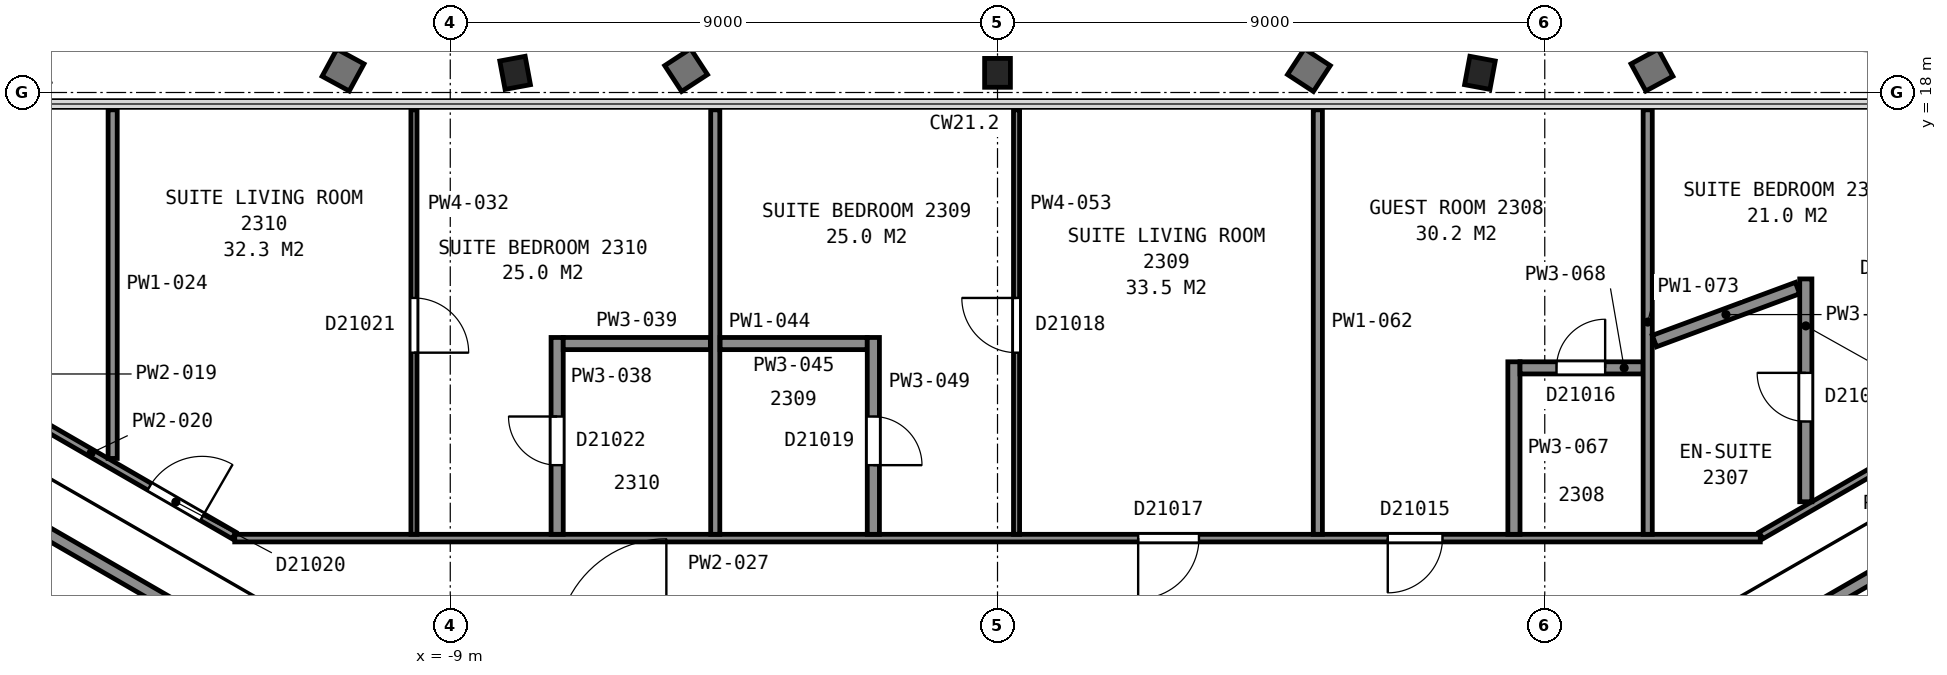
"""IFC4 building model, lengths in metres.
Left out: names, types, materials, properties, quantities, classifications, styles, units other than length and angle.
Written with IfcOpenShell. Run it as: python <this file> out.ifc"""

import sys

from ifc_helpers import new_model, si_unit, direction, frame, frame_2d, origin, origin_2d, place, context, subcontext, project, spatial, rectangle, i_section, extrude, element, fill, save


model = new_model("IFC4")
c1 = context("Model", 3, precision=1e-05, world=origin(), true_north=direction((0.0, 1.0)))
c2 = subcontext(c1, "Body", "Model", "MODEL_VIEW")
j1 = project(units=[si_unit("LENGTHUNIT", "METRE"), si_unit("PLANEANGLEUNIT", "RADIAN")], contexts=[c1])
p1 = place(None, origin())
s1 = spatial("IfcSite", under=j1, at=p1, CompositionType="ELEMENT")
p2 = place(p1, origin())
s2 = spatial("IfcBuilding", under=s1, at=p2, CompositionType="ELEMENT")
p3 = place(p2, frame((0.0, 0.0, 100.0)))
s3 = spatial("IfcBuildingStorey", under=s2, at=p3, CompositionType="ELEMENT", Elevation=100.0)
p4 = place(p3, frame((7.891, 18.098, 0.04), z_axis=(0.035448987622, 0.190716914211, 0.981004805243), x_axis=(0.999348805, -0.000151262894, -0.036082448156)))
e1 = element("IfcColumn", 1, at=p4, inside=s3, PredefinedType="COLUMN", context=c2, shape_type="SweptSolid", body=[
    extrude(i_section(OverallWidth=0.424, OverallDepth=0.475, WebThickness=0.048, FlangeThickness=0.077, FilletRadius=0.015, at=origin_2d()), origin(), (0.0, 0.0, 1.0), 3.588),
])
p5 = place(p3, frame((0.0, 18.097, 0.035), z_axis=(0.0, 0.190904184005, 0.981608675863), x_axis=(1.0, 0.0, 0.0)))
e2 = element("IfcColumn", 2, at=p5, inside=s3, PredefinedType="COLUMN", context=c2, shape_type="SweptSolid", body=[
    extrude(i_section(OverallWidth=0.424, OverallDepth=0.475, WebThickness=0.048, FlangeThickness=0.077, FilletRadius=0.015, at=origin_2d()), origin(), (0.0, 0.0, 1.0), 3.596),
])
p6 = place(p3, frame((-7.891, 18.098, 0.04), z_axis=(-0.035448987622, 0.190716914211, 0.981004805243), x_axis=(0.999348805, 0.000151262894, 0.036082448156)))
e3 = element("IfcColumn", 3, at=p6, inside=s3, PredefinedType="COLUMN", context=c2, shape_type="SweptSolid", body=[
    extrude(i_section(OverallWidth=0.424, OverallDepth=0.475, WebThickness=0.048, FlangeThickness=0.077, FilletRadius=0.015, at=origin_2d()), origin(), (0.0, 0.0, 1.0), 3.588),
])
for number, where, z_axis, x_axis in (
    (4, (6.178, 5.299, 0.0), (0.0, 0.0, 1.0), (0.866, 0.5, 0.0)),
    (5, (-6.178, 5.299, 0.0), (0.0, 0.0, 1.0), (-0.866, 0.5, 0.0)),
):
    element("IfcWall", number, at=place(p3, frame(where, z_axis=z_axis, x_axis=x_axis)), inside=s3, PredefinedType="PARTITIONING", context=c2, shape_type="SweptSolid", body=[
        extrude(rectangle(XDim=12.0, YDim=0.2, at=frame_2d((6.0, 0.0))), origin(), (0.0, 0.0, 1.0), 3.35),
    ])
p7 = place(p3, frame((-15.867, 12.625, 0.0), z_axis=(0.0, 0.0, 1.0), x_axis=(0.86603035395, -0.499991425964, 0.0)))
e6 = element("IfcWall", 6, at=p7, inside=s3, PredefinedType="PARTITIONING", context=c2, shape_type="SweptSolid", body=[
    extrude(rectangle(XDim=3.824, YDim=0.125, at=frame_2d((1.912, 0.0))), origin(), (0.0, 0.0, 1.0), 2.613),
])
p8 = place(p7, frame((2.219, 0.0, 0.0)))
e7 = element("IfcOpeningElement", 7, at=p8, cuts=e6, PredefinedType="OPENING", context=c2, shape_type="SweptSolid", body=[
    extrude(rectangle(XDim=1.0, YDim=2.1, at=frame_2d((0.5, 1.05))), frame((0.0, 0.073, 0.0), z_axis=(0.0, -1.0, 0.0), x_axis=(1.0, 0.0, 0.0)), (0.0, 0.0, 1.0), 0.145),
])
p9 = place(p3, frame((-14.552, 11.981, 0.0), z_axis=(0.0, 0.0, 1.0), x_axis=(0.0, 1.0, 0.0)))
e8 = element("IfcWall", 8, at=p9, inside=s3, PredefinedType="PARTITIONING", context=c2, shape_type="SweptSolid", body=[
    extrude(rectangle(XDim=5.734, YDim=0.15, at=frame_2d((2.867, 0.0))), origin(), (0.0, 0.0, 1.0), 2.613),
])
p10 = place(p3, frame((-12.544, 10.671, 0.0), z_axis=(0.0, 0.0, 1.0), x_axis=(1.0, 0.0, 0.0)))
e9 = element("IfcWall", 9, at=p10, inside=s3, PredefinedType="PARTITIONING", context=c2, shape_type="SweptSolid", body=[
    extrude(rectangle(XDim=25.089, YDim=0.125, at=frame_2d((12.544, 0.0))), origin(), (0.0, 0.0, 1.0), 2.613),
])
p11 = place(p10, frame((18.962, 0.0, 0.0)))
e10 = element("IfcOpeningElement", 10, at=p11, cuts=e9, PredefinedType="OPENING", context=c2, shape_type="SweptSolid", body=[
    extrude(rectangle(XDim=0.9, YDim=2.1, at=frame_2d((0.45, 1.05))), frame((0.0, 0.073, 0.0), z_axis=(0.0, -1.0, 0.0), x_axis=(1.0, 0.0, 0.0)), (0.0, 0.0, 1.0), 0.145),
])
p12 = place(p10, frame((14.857, 0.0, 0.0)))
e11 = element("IfcOpeningElement", 11, at=p12, cuts=e9, PredefinedType="OPENING", context=c2, shape_type="SweptSolid", body=[
    extrude(rectangle(XDim=1.0, YDim=2.1, at=frame_2d((0.5, 1.05))), frame((0.0, 0.073, 0.0), z_axis=(0.0, -1.0, 0.0), x_axis=(1.0, 0.0, 0.0)), (0.0, 0.0, 1.0), 0.145),
])
p13 = place(p3, frame((-9.597, 17.715, 0.0), z_axis=(0.0, 0.0, 1.0), x_axis=(0.0, -1.0, 0.0)))
e12 = element("IfcWall", 12, at=p13, inside=s3, PredefinedType="PARTITIONING", context=c2, shape_type="SweptSolid", body=[
    extrude(rectangle(XDim=6.982, YDim=0.1, at=frame_2d((3.491, 0.0))), origin(), (0.0, 0.0, 1.0), 2.613),
])
p14 = place(p13, frame((3.094, 0.0, 0.0)))
e13 = element("IfcOpeningElement", 13, at=p14, cuts=e12, PredefinedType="OPENING", context=c2, shape_type="SweptSolid", body=[
    extrude(rectangle(XDim=0.9, YDim=2.1, at=frame_2d((0.45, 1.05))), frame((0.0, 0.06, 0.0), z_axis=(0.0, -1.0, 0.0), x_axis=(1.0, 0.0, 0.0)), (0.0, 0.0, 1.0), 0.12),
])
p15 = place(p3, frame((-7.242, 13.971, 0.0), z_axis=(0.0, 0.0, 1.0), x_axis=(0.0, -1.0, 0.0)))
e14 = element("IfcWall", 14, at=p15, inside=s3, PredefinedType="PARTITIONING", context=c2, shape_type="SweptSolid", body=[
    extrude(rectangle(XDim=3.238, YDim=0.2, at=frame_2d((1.619, 0.0))), origin(), (0.0, 0.0, 1.0), 2.613),
])
p16 = place(p15, frame((1.3, 0.0, 0.0)))
e15 = element("IfcOpeningElement", 15, at=p16, cuts=e14, PredefinedType="OPENING", context=c2, shape_type="SweptSolid", body=[
    extrude(rectangle(XDim=0.8, YDim=2.1, at=frame_2d((0.4, 1.05))), frame((0.0, 0.11, 0.0), z_axis=(0.0, -1.0, 0.0), x_axis=(1.0, 0.0, 0.0)), (0.0, 0.0, 1.0), 0.22),
])
p17 = place(p3, frame((-7.142, 13.871, 0.0), z_axis=(0.0, 0.0, 1.0), x_axis=(1.0, 0.0, 0.0)))
e16 = element("IfcWall", 16, at=p17, inside=s3, PredefinedType="PARTITIONING", context=c2, shape_type="SweptSolid", body=[
    extrude(rectangle(XDim=2.42, YDim=0.2, at=frame_2d((1.21, 0.0))), origin(), (0.0, 0.0, 1.0), 2.613),
])
p18 = place(p3, frame((-4.642, 10.733, 0.0), z_axis=(0.0, 0.0, 1.0), x_axis=(0.0, 1.0, 0.0)))
e17 = element("IfcWall", 17, at=p18, inside=s3, PredefinedType="PARTITIONING", context=c2, shape_type="SweptSolid", body=[
    extrude(rectangle(XDim=6.982, YDim=0.15, at=frame_2d((3.491, 0.0))), origin(), (0.0, 0.0, 1.0), 2.613),
])
p19 = place(p3, frame((-4.562, 13.871, 0.0), z_axis=(0.0, 0.0, 1.0), x_axis=(1.0, 0.0, 0.0)))
e18 = element("IfcWall", 18, at=p19, inside=s3, PredefinedType="PARTITIONING", context=c2, shape_type="SweptSolid", body=[
    extrude(rectangle(XDim=2.42, YDim=0.2, at=frame_2d((1.21, 0.0))), origin(), (0.0, 0.0, 1.0), 2.613),
])
p20 = place(p3, frame((-2.042, 10.733, 0.0), z_axis=(0.0, 0.0, 1.0), x_axis=(0.0, 1.0, 0.0)))
e19 = element("IfcWall", 19, at=p20, inside=s3, PredefinedType="PARTITIONING", context=c2, shape_type="SweptSolid", body=[
    extrude(rectangle(XDim=3.238, YDim=0.2, at=frame_2d((1.619, 0.0))), origin(), (0.0, 0.0, 1.0), 2.613),
])
p21 = place(p20, frame((1.137, 0.0, 0.0)))
e20 = element("IfcOpeningElement", 20, at=p21, cuts=e19, PredefinedType="OPENING", context=c2, shape_type="SweptSolid", body=[
    extrude(rectangle(XDim=0.8, YDim=2.1, at=frame_2d((0.4, 1.05))), frame((0.0, 0.11, 0.0), z_axis=(0.0, -1.0, 0.0), x_axis=(1.0, 0.0, 0.0)), (0.0, 0.0, 1.0), 0.22),
])
p22 = place(p3, frame((0.313, 10.733, 0.0), z_axis=(0.0, 0.0, 1.0), x_axis=(0.0, 1.0, 0.0)))
e21 = element("IfcWall", 21, at=p22, inside=s3, PredefinedType="PARTITIONING", context=c2, shape_type="SweptSolid", body=[
    extrude(rectangle(XDim=6.982, YDim=0.1, at=frame_2d((3.491, 0.0))), origin(), (0.0, 0.0, 1.0), 2.613),
])
p23 = place(p22, frame((2.988, 0.0, 0.0)))
e22 = element("IfcOpeningElement", 22, at=p23, cuts=e21, PredefinedType="OPENING", context=c2, shape_type="SweptSolid", body=[
    extrude(rectangle(XDim=0.9, YDim=2.1, at=frame_2d((0.45, 1.05))), frame((0.0, 0.06, 0.0), z_axis=(0.0, -1.0, 0.0), x_axis=(1.0, 0.0, 0.0)), (0.0, 0.0, 1.0), 0.12),
])
p24 = place(p3, frame((5.268, 10.733, 0.0), z_axis=(0.0, 0.0, 1.0), x_axis=(0.0, 1.0, 0.0)))
e23 = element("IfcWall", 23, at=p24, inside=s3, PredefinedType="PARTITIONING", context=c2, shape_type="SweptSolid", body=[
    extrude(rectangle(XDim=6.982, YDim=0.15, at=frame_2d((3.491, 0.0))), origin(), (0.0, 0.0, 1.0), 2.613),
])
p25 = place(p3, frame((8.493, 10.733, 0.0), z_axis=(0.0, 0.0, 1.0), x_axis=(0.0, 1.0, 0.0)))
e24 = element("IfcWall", 24, at=p25, inside=s3, PredefinedType="PARTITIONING", context=c2, shape_type="SweptSolid", body=[
    extrude(rectangle(XDim=2.838, YDim=0.2, at=frame_2d((1.419, 0.0))), origin(), (0.0, 0.0, 1.0), 2.613),
])
p26 = place(p3, frame((10.618, 13.471, 0.0), z_axis=(0.0, 0.0, 1.0), x_axis=(-1.0, 0.0, 0.0)))
e25 = element("IfcWall", 25, at=p26, inside=s3, PredefinedType="PARTITIONING", context=c2, shape_type="SweptSolid", body=[
    extrude(rectangle(XDim=2.025, YDim=0.2, at=frame_2d((1.012, 0.0))), origin(), (0.0, 0.0, 1.0), 2.613),
])
p27 = place(p26, frame((0.625, 0.0, 0.0)))
e26 = element("IfcOpeningElement", 26, at=p27, cuts=e25, PredefinedType="OPENING", context=c2, shape_type="SweptSolid", body=[
    extrude(rectangle(XDim=0.8, YDim=2.1, at=frame_2d((0.4, 1.05))), frame((0.0, 0.11, 0.0), z_axis=(0.0, -1.0, 0.0), x_axis=(1.0, 0.0, 0.0)), (0.0, 0.0, 1.0), 0.22),
])
p28 = place(p3, frame((10.693, 10.733, 0.0), z_axis=(0.0, 0.0, 1.0), x_axis=(0.0, 1.0, 0.0)))
e27 = element("IfcWall", 27, at=p28, inside=s3, PredefinedType="PARTITIONING", context=c2, shape_type="SweptSolid", body=[
    extrude(rectangle(XDim=6.982, YDim=0.15, at=frame_2d((3.491, 0.0))), origin(), (0.0, 0.0, 1.0), 2.613),
])
p29 = place(p3, frame((10.803, 13.912, 0.0), z_axis=(0.0, 0.0, 1.0), x_axis=(0.937732337139, 0.347358696283, 0.0)))
e28 = element("IfcWall", 28, at=p29, inside=s3, PredefinedType="PARTITIONING", context=c2, shape_type="SweptSolid", body=[
    extrude(rectangle(XDim=2.51, YDim=0.2, at=frame_2d((1.255, 0.0))), origin(), (0.0, 0.0, 1.0), 2.613),
])
p30 = place(p3, frame((12.556, 10.713, 0.0), z_axis=(0.0, 0.0, 1.0), x_axis=(0.86603035395, 0.499991425964, 0.0)))
e29 = element("IfcWall", 29, at=p30, inside=s3, PredefinedType="PARTITIONING", context=c2, shape_type="SweptSolid", body=[
    extrude(rectangle(XDim=3.824, YDim=0.125, at=frame_2d((1.912, 0.0))), origin(), (0.0, 0.0, 1.0), 2.613),
])
p31 = place(p3, frame((13.293, 11.269, 0.0), z_axis=(0.0, 0.0, 1.0), x_axis=(0.0, 1.0, 0.0)))
e30 = element("IfcWall", 30, at=p31, inside=s3, PredefinedType="PARTITIONING", context=c2, shape_type="SweptSolid", body=[
    extrude(rectangle(XDim=3.665, YDim=0.2, at=frame_2d((1.833, 0.0))), origin(), (0.0, 0.0, 1.0), 2.613),
])
p32 = place(p31, frame((1.32, 0.0, 0.0)))
e31 = element("IfcOpeningElement", 31, at=p32, cuts=e30, PredefinedType="OPENING", context=c2, shape_type="SweptSolid", body=[
    extrude(rectangle(XDim=0.8, YDim=2.1, at=frame_2d((0.4, 1.05))), frame((0.0, 0.11, 0.0), z_axis=(0.0, -1.0, 0.0), x_axis=(1.0, 0.0, 0.0)), (0.0, 0.0, 1.0), 0.22),
])
p33 = place(p8, origin())
e32 = element("IfcDoor", 32, at=p33, inside=s3, OperationType="SINGLE_SWING_RIGHT", PredefinedType="DOOR", context=c2, shape_type="SweptSolid", body=[
    extrude(rectangle(XDim=1.0, YDim=2.1, at=frame_2d((0.5, 1.05))), frame((0.0, 0.025, 0.0), z_axis=(0.0, -1.0, 0.0), x_axis=(1.0, 0.0, 0.0)), (0.0, 0.0, 1.0), 0.05),
])
fill(e7, e32)
p34 = place(p11, origin())
e33 = element("IfcDoor", 33, at=p34, inside=s3, OperationType="SINGLE_SWING_LEFT", PredefinedType="DOOR", context=c2, shape_type="SweptSolid", body=[
    extrude(rectangle(XDim=0.9, YDim=2.1, at=frame_2d((0.45, 1.05))), frame((0.0, 0.025, 0.0), z_axis=(0.0, -1.0, 0.0), x_axis=(1.0, 0.0, 0.0)), (0.0, 0.0, 1.0), 0.05),
])
fill(e10, e33)
p35 = place(p12, origin())
e34 = element("IfcDoor", 34, at=p35, inside=s3, OperationType="SINGLE_SWING_LEFT", PredefinedType="DOOR", context=c2, shape_type="SweptSolid", body=[
    extrude(rectangle(XDim=1.0, YDim=2.1, at=frame_2d((0.5, 1.05))), frame((0.0, 0.025, 0.0), z_axis=(0.0, -1.0, 0.0), x_axis=(1.0, 0.0, 0.0)), (0.0, 0.0, 1.0), 0.05),
])
fill(e11, e34)
p36 = place(p14, origin())
e35 = element("IfcDoor", 35, at=p36, inside=s3, OperationType="SINGLE_SWING_RIGHT", PredefinedType="DOOR", context=c2, shape_type="SweptSolid", body=[
    extrude(rectangle(XDim=0.9, YDim=2.1, at=frame_2d((0.45, 1.05))), frame((0.0, 0.025, 0.0), z_axis=(0.0, -1.0, 0.0), x_axis=(1.0, 0.0, 0.0)), (0.0, 0.0, 1.0), 0.05),
])
fill(e13, e35)
p37 = place(p16, origin())
e36 = element("IfcDoor", 36, at=p37, inside=s3, OperationType="SINGLE_SWING_LEFT", PredefinedType="DOOR", context=c2, shape_type="SweptSolid", body=[
    extrude(rectangle(XDim=0.8, YDim=2.1, at=frame_2d((0.4, 1.05))), frame((0.0, 0.025, 0.0), z_axis=(0.0, -1.0, 0.0), x_axis=(1.0, 0.0, 0.0)), (0.0, 0.0, 1.0), 0.05),
])
fill(e15, e36)
p38 = place(p21, origin())
e37 = element("IfcDoor", 37, at=p38, inside=s3, OperationType="SINGLE_SWING_LEFT", PredefinedType="DOOR", context=c2, shape_type="SweptSolid", body=[
    extrude(rectangle(XDim=0.8, YDim=2.1, at=frame_2d((0.4, 1.05))), frame((0.0, 0.025, 0.0), z_axis=(0.0, -1.0, 0.0), x_axis=(1.0, 0.0, 0.0)), (0.0, 0.0, 1.0), 0.05),
])
fill(e20, e37)
p39 = place(p23, origin())
e38 = element("IfcDoor", 38, at=p39, inside=s3, OperationType="SINGLE_SWING_RIGHT", PredefinedType="DOOR", context=c2, shape_type="SweptSolid", body=[
    extrude(rectangle(XDim=0.9, YDim=2.1, at=frame_2d((0.45, 1.05))), frame((0.0, 0.025, 0.0), z_axis=(0.0, -1.0, 0.0), x_axis=(1.0, 0.0, 0.0)), (0.0, 0.0, 1.0), 0.05),
])
fill(e22, e38)
p40 = place(p27, origin())
e39 = element("IfcDoor", 39, at=p40, inside=s3, OperationType="SINGLE_SWING_LEFT", PredefinedType="DOOR", context=c2, shape_type="SweptSolid", body=[
    extrude(rectangle(XDim=0.8, YDim=2.1, at=frame_2d((0.4, 1.05))), frame((0.0, 0.025, 0.0), z_axis=(0.0, -1.0, 0.0), x_axis=(1.0, 0.0, 0.0)), (0.0, 0.0, 1.0), 0.05),
])
fill(e26, e39)
p41 = place(p32, origin())
e40 = element("IfcDoor", 40, at=p41, inside=s3, OperationType="SINGLE_SWING_RIGHT", PredefinedType="DOOR", context=c2, shape_type="SweptSolid", body=[
    extrude(rectangle(XDim=0.8, YDim=2.1, at=frame_2d((0.4, 1.05))), frame((0.0, 0.025, 0.0), z_axis=(0.0, -1.0, 0.0), x_axis=(1.0, 0.0, 0.0)), (0.0, 0.0, 1.0), 0.05),
])
fill(e31, e40)
save(model, sys.argv[1])
